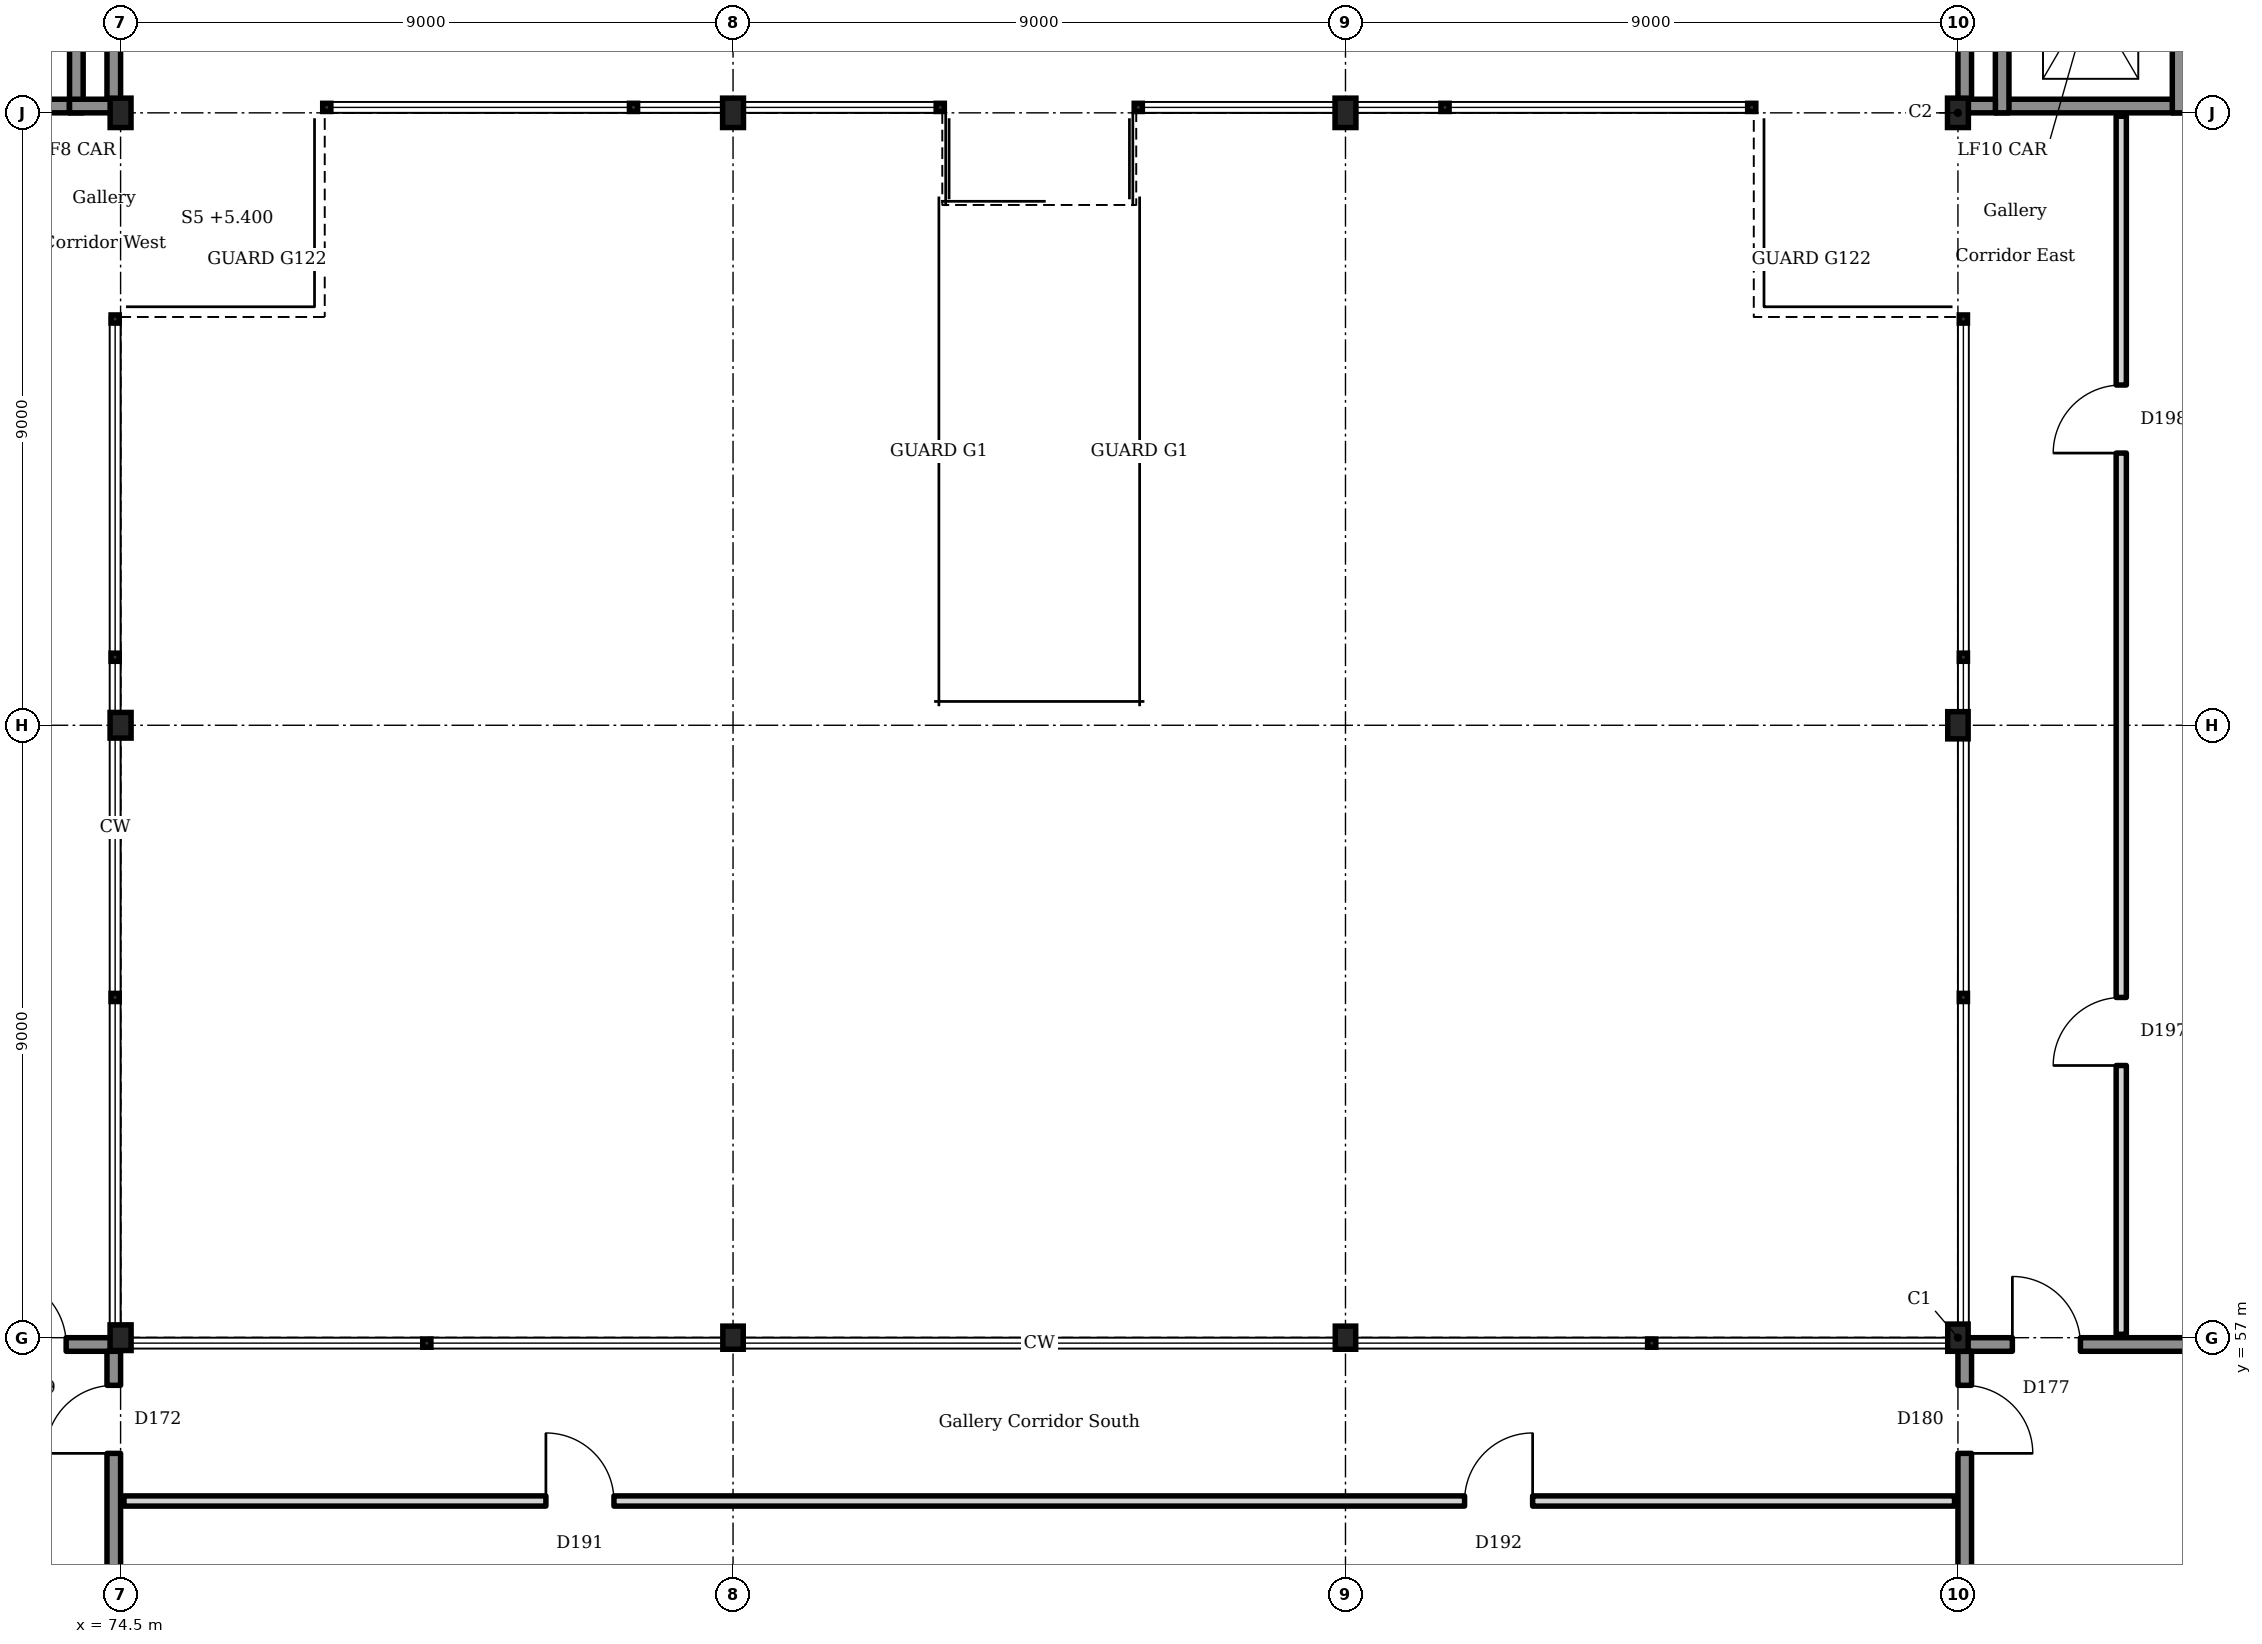
"""IFC4 building model, lengths in metres.
Left out: names, types, materials, properties, quantities, classifications, styles, units other than length and angle.
Written with IfcOpenShell. Run it as: python <this file> out.ifc"""

import sys

from ifc_helpers import new_model, si_unit, direction, frame, frame_2d, origin, origin_2d, place, context, subcontext, project, spatial, rectangle, i_section, extrude, element, fill, save


model = new_model("IFC4")
c1 = context("Model", 3, precision=1e-05, world=origin(), true_north=direction((0.0, 1.0)))
c2 = subcontext(c1, "Body", "Model", "MODEL_VIEW")
j1 = project(units=[si_unit("LENGTHUNIT", "METRE"), si_unit("PLANEANGLEUNIT", "RADIAN")], contexts=[c1])
p1 = place(None, origin())
s1 = spatial("IfcSite", under=j1, at=p1, CompositionType="ELEMENT")
p2 = place(p1, origin())
s2 = spatial("IfcBuilding", under=s1, at=p2, CompositionType="ELEMENT")
p3 = place(p2, frame((0.0, 0.0, 5.4)))
s3 = spatial("IfcBuildingStorey", under=s2, at=p3, CompositionType="ELEMENT", Elevation=5.4)
p4 = place(p3, frame((71.15, 75.1, 0.0), z_axis=(0.0, 0.0, 1.0), x_axis=(1.0, 0.0, 0.0)))
e1 = element("IfcWall", 1, at=p4, inside=s3, PredefinedType="SOLIDWALL", context=c2, shape_type="SweptSolid", body=[
    extrude(rectangle(XDim=2.6, YDim=0.2, at=frame_2d((1.3, 0.0))), origin(), (0.0, 0.0, 1.0), 4.5),
])
p5 = place(p3, frame((73.85, 75.0, 0.0), z_axis=(0.0, 0.0, 1.0), x_axis=(0.0, 1.0, 0.0)))
e2 = element("IfcWall", 2, at=p5, inside=s3, PredefinedType="SOLIDWALL", context=c2, shape_type="SweptSolid", body=[
    extrude(rectangle(XDim=3.4, YDim=0.2, at=frame_2d((1.7, 0.0))), origin(), (0.0, 0.0, 1.0), 4.5),
])
p6 = place(p3, frame((104.65, 75.1, 0.0), z_axis=(0.0, 0.0, 1.0), x_axis=(1.0, 0.0, 0.0)))
e3 = element("IfcWall", 3, at=p6, inside=s3, PredefinedType="SOLIDWALL", context=c2, shape_type="SweptSolid", body=[
    extrude(rectangle(XDim=2.6, YDim=0.2, at=frame_2d((1.3, 0.0))), origin(), (0.0, 0.0, 1.0), 4.5),
])
p7 = place(p3, frame((104.75, 75.0, 0.0), z_axis=(0.0, 0.0, 1.0), x_axis=(0.0, 1.0, 0.0)))
e4 = element("IfcWall", 4, at=p7, inside=s3, PredefinedType="SOLIDWALL", context=c2, shape_type="SweptSolid", body=[
    extrude(rectangle(XDim=3.4, YDim=0.2, at=frame_2d((1.7, 0.0))), origin(), (0.0, 0.0, 1.0), 4.5),
])
p8 = place(p3, frame((102.05, 75.1, 0.0), z_axis=(0.0, 0.0, 1.0), x_axis=(1.0, 0.0, 0.0)))
e5 = element("IfcWall", 5, at=p8, inside=s3, PredefinedType="SOLIDWALL", context=c2, shape_type="SweptSolid", body=[
    extrude(rectangle(XDim=2.6, YDim=0.2, at=frame_2d((1.3, 0.0))), origin(), (0.0, 0.0, 1.0), 4.5),
])
p9 = place(p3, frame((102.15, 75.0, 0.0), z_axis=(0.0, 0.0, 1.0), x_axis=(0.0, 1.0, 0.0)))
e6 = element("IfcWall", 6, at=p9, inside=s3, PredefinedType="SOLIDWALL", context=c2, shape_type="SweptSolid", body=[
    extrude(rectangle(XDim=3.4, YDim=0.2, at=frame_2d((1.7, 0.0))), origin(), (0.0, 0.0, 1.0), 4.5),
])
p10 = place(p3, frame((101.5, 57.0, 0.0), z_axis=(0.0, 0.0, 1.0), x_axis=(1.0, 0.0, 0.0)))
e7 = element("IfcColumn", 7, at=p10, inside=s3, PredefinedType="COLUMN", context=c2, shape_type="SweptSolid", body=[
    extrude(i_section(OverallWidth=0.3, OverallDepth=0.4, WebThickness=0.013, FlangeThickness=0.024, FilletRadius=0.027, at=origin_2d()), origin(), (0.0, 0.0, 1.0), 4.5),
])
p11 = place(p3, frame((74.5, 57.0, 0.0), z_axis=(0.0, 0.0, 1.0), x_axis=(1.0, 0.0, 0.0)))
e8 = element("IfcColumn", 8, at=p11, inside=s3, PredefinedType="COLUMN", context=c2, shape_type="SweptSolid", body=[
    extrude(i_section(OverallWidth=0.309, OverallDepth=0.377, WebThickness=0.021, FlangeThickness=0.04, FilletRadius=0.027, at=origin_2d()), origin(), (0.0, 0.0, 1.0), 4.5),
])
for number, where, z_axis, x_axis in (
    (9, (83.5, 57.0, 0.0), (0.0, 0.0, 1.0), (1.0, 0.0, 0.0)),
    (10, (92.5, 57.0, 0.0), (0.0, 0.0, 1.0), (1.0, 0.0, 0.0)),
):
    element("IfcColumn", number, at=place(p3, frame(where, z_axis=z_axis, x_axis=x_axis)), inside=s3, PredefinedType="COLUMN", context=c2, shape_type="SweptSolid", body=[
        extrude(i_section(OverallWidth=0.3, OverallDepth=0.34, WebThickness=0.012, FlangeThickness=0.021, FilletRadius=0.027, at=origin_2d()), origin(), (0.0, 0.0, 1.0), 4.25),
    ])
p12 = place(p3, frame((101.5, 66.0, 0.0), z_axis=(0.0, 0.0, 1.0), x_axis=(1.0, 0.0, 0.0)))
e11 = element("IfcColumn", 11, at=p12, inside=s3, PredefinedType="COLUMN", context=c2, shape_type="SweptSolid", body=[
    extrude(i_section(OverallWidth=0.3, OverallDepth=0.4, WebThickness=0.013, FlangeThickness=0.024, FilletRadius=0.027, at=origin_2d()), origin(), (0.0, 0.0, 1.0), 4.5),
])
p13 = place(p3, frame((74.5, 66.0, 0.0), z_axis=(0.0, 0.0, 1.0), x_axis=(1.0, 0.0, 0.0)))
e12 = element("IfcColumn", 12, at=p13, inside=s3, PredefinedType="COLUMN", context=c2, shape_type="SweptSolid", body=[
    extrude(i_section(OverallWidth=0.309, OverallDepth=0.377, WebThickness=0.021, FlangeThickness=0.04, FilletRadius=0.027, at=origin_2d()), origin(), (0.0, 0.0, 1.0), 4.5),
])
for number, where, z_axis, x_axis in (
    (13, (101.5, 75.0, 0.0), (0.0, 0.0, 1.0), (1.0, 0.0, 0.0)),
    (14, (74.5, 75.0, 0.0), (0.0, 0.0, 1.0), (1.0, 0.0, 0.0)),
    (15, (83.5, 75.0, 0.0), (0.0, 0.0, 1.0), (1.0, 0.0, 0.0)),
    (16, (92.5, 75.0, 0.0), (0.0, 0.0, 1.0), (1.0, 0.0, 0.0)),
):
    element("IfcColumn", number, at=place(p3, frame(where, z_axis=z_axis, x_axis=x_axis)), inside=s3, PredefinedType="COLUMN", context=c2, shape_type="SweptSolid", body=[
        extrude(i_section(OverallWidth=0.307, OverallDepth=0.432, WebThickness=0.021, FlangeThickness=0.04, FilletRadius=0.027, at=origin_2d()), origin(), (0.0, 0.0, 1.0), 4.5),
    ])
p14 = place(p3, frame((73.75, 75.1, 0.0), z_axis=(0.0, 0.0, 1.0), x_axis=(1.0, 0.0, 0.0)))
e17 = element("IfcWall", 17, at=p14, inside=s3, PredefinedType="SHEAR", context=c2, shape_type="SweptSolid", body=[
    extrude(rectangle(XDim=0.75, YDim=0.2, at=frame_2d((0.375, 0.0))), origin(), (0.0, 0.0, 1.0), 3.75),
])
p15 = place(p3, frame((74.4, 75.2, 0.0), z_axis=(0.0, 0.0, 1.0), x_axis=(0.0, 1.0, 0.0)))
e18 = element("IfcWall", 18, at=p15, inside=s3, PredefinedType="SHEAR", context=c2, shape_type="SweptSolid", body=[
    extrude(rectangle(XDim=8.6, YDim=0.2, at=frame_2d((4.3, 0.0))), origin(), (0.0, 0.0, 1.0), 3.75),
])
p16 = place(p15, frame((4.9, 0.0, 0.0)))
e19 = element("IfcOpeningElement", 19, at=p16, cuts=e18, PredefinedType="OPENING", context=c2, shape_type="SweptSolid", body=[
    extrude(rectangle(XDim=1.8, YDim=2.1, at=frame_2d((0.9, 1.05))), frame((0.0, 0.11, 0.0), z_axis=(0.0, -1.0, 0.0), x_axis=(1.0, 0.0, 0.0)), (0.0, 0.0, 1.0), 0.22),
])
p17 = place(p3, frame((101.5, 75.1, 0.0), z_axis=(0.0, 0.0, 1.0), x_axis=(1.0, 0.0, 0.0)))
e20 = element("IfcWall", 20, at=p17, inside=s3, PredefinedType="SHEAR", context=c2, shape_type="SweptSolid", body=[
    extrude(rectangle(XDim=0.55, YDim=0.2, at=frame_2d((0.275, 0.0))), origin(), (0.0, 0.0, 1.0), 3.75),
])
p18 = place(p3, frame((101.6, 75.2, 0.0), z_axis=(0.0, 0.0, 1.0), x_axis=(0.0, 1.0, 0.0)))
e21 = element("IfcWall", 21, at=p18, inside=s3, PredefinedType="SHEAR", context=c2, shape_type="SweptSolid", body=[
    extrude(rectangle(XDim=8.6, YDim=0.2, at=frame_2d((4.3, 0.0))), origin(), (0.0, 0.0, 1.0), 3.75),
])
p19 = place(p18, frame((4.9, 0.0, 0.0)))
e22 = element("IfcOpeningElement", 22, at=p19, cuts=e21, PredefinedType="OPENING", context=c2, shape_type="SweptSolid", body=[
    extrude(rectangle(XDim=1.8, YDim=2.1, at=frame_2d((0.9, 1.05))), frame((0.0, 0.11, 0.0), z_axis=(0.0, -1.0, 0.0), x_axis=(1.0, 0.0, 0.0)), (0.0, 0.0, 1.0), 0.22),
])
p20 = place(p3, frame((65.5, 56.9, 0.0), z_axis=(0.0, 0.0, 1.0), x_axis=(1.0, 0.0, 0.0)))
e23 = element("IfcWall", 23, at=p20, inside=s3, PredefinedType="SHEAR", context=c2, shape_type="SweptSolid", body=[
    extrude(rectangle(XDim=9.0, YDim=0.2, at=frame_2d((4.5, 0.0))), origin(), (0.0, 0.0, 1.0), 4.25),
])
p21 = place(p20, frame((7.2, 0.0, 0.0)))
e24 = element("IfcOpeningElement", 24, at=p21, cuts=e23, PredefinedType="OPENING", context=c2, shape_type="SweptSolid", body=[
    extrude(rectangle(XDim=1.0, YDim=2.1, at=frame_2d((0.5, 1.05))), frame((0.0, 0.11, 0.0), z_axis=(0.0, -1.0, 0.0), x_axis=(1.0, 0.0, 0.0)), (0.0, 0.0, 1.0), 0.22),
])
p22 = place(p3, frame((74.4, 48.15, 0.0), z_axis=(0.0, 0.0, 1.0), x_axis=(0.0, 1.0, 0.0)))
e25 = element("IfcWall", 25, at=p22, inside=s3, PredefinedType="SHEAR", context=c2, shape_type="SweptSolid", body=[
    extrude(rectangle(XDim=8.65, YDim=0.2, at=frame_2d((4.325, 0.0))), origin(), (0.0, 0.0, 1.0), 3.8),
])
p23 = place(p22, frame((7.15, 0.0, 0.0)))
e26 = element("IfcOpeningElement", 26, at=p23, cuts=e25, PredefinedType="OPENING", context=c2, shape_type="SweptSolid", body=[
    extrude(rectangle(XDim=1.0, YDim=2.1, at=frame_2d((0.5, 1.05))), frame((0.0, 0.11, 0.0), z_axis=(0.0, -1.0, 0.0), x_axis=(1.0, 0.0, 0.0)), (0.0, 0.0, 1.0), 0.22),
])
p24 = place(p3, frame((101.5, 56.9, 0.0), z_axis=(0.0, 0.0, 1.0), x_axis=(1.0, 0.0, 0.0)))
e27 = element("IfcWall", 27, at=p24, inside=s3, PredefinedType="SHEAR", context=c2, shape_type="SweptSolid", body=[
    extrude(rectangle(XDim=9.0, YDim=0.2, at=frame_2d((4.5, 0.0))), origin(), (0.0, 0.0, 1.0), 4.25),
])
p25 = place(p24, frame((0.8, 0.0, 0.0)))
e28 = element("IfcOpeningElement", 28, at=p25, cuts=e27, PredefinedType="OPENING", context=c2, shape_type="SweptSolid", body=[
    extrude(rectangle(XDim=1.0, YDim=2.1, at=frame_2d((0.5, 1.05))), frame((0.0, 0.11, 0.0), z_axis=(0.0, -1.0, 0.0), x_axis=(1.0, 0.0, 0.0)), (0.0, 0.0, 1.0), 0.22),
])
p26 = place(p3, frame((101.6, 48.15, 0.0), z_axis=(0.0, 0.0, 1.0), x_axis=(0.0, 1.0, 0.0)))
e29 = element("IfcWall", 29, at=p26, inside=s3, PredefinedType="SHEAR", context=c2, shape_type="SweptSolid", body=[
    extrude(rectangle(XDim=8.65, YDim=0.2, at=frame_2d((4.325, 0.0))), origin(), (0.0, 0.0, 1.0), 3.8),
])
p27 = place(p26, frame((7.15, 0.0, 0.0)))
e30 = element("IfcOpeningElement", 30, at=p27, cuts=e29, PredefinedType="OPENING", context=c2, shape_type="SweptSolid", body=[
    extrude(rectangle(XDim=1.0, YDim=2.1, at=frame_2d((0.5, 1.05))), frame((0.0, 0.11, 0.0), z_axis=(0.0, -1.0, 0.0), x_axis=(1.0, 0.0, 0.0)), (0.0, 0.0, 1.0), 0.22),
])
p28 = place(p3, frame((74.55, 54.6, 0.0), z_axis=(0.0, 0.0, 1.0), x_axis=(1.0, 0.0, 0.0)))
e31 = element("IfcWall", 31, at=p28, inside=s3, PredefinedType="PARTITIONING", context=c2, shape_type="SweptSolid", body=[
    extrude(rectangle(XDim=26.9, YDim=0.15, at=frame_2d((13.45, 0.0))), origin(), (0.0, 0.0, 1.0), 3.65),
])
p29 = place(p28, frame((6.2, 0.0, 0.0)))
e32 = element("IfcOpeningElement", 32, at=p29, cuts=e31, PredefinedType="OPENING", context=c2, shape_type="SweptSolid", body=[
    extrude(rectangle(XDim=1.0, YDim=2.1, at=frame_2d((0.5, 1.05))), frame((0.0, 0.085, 0.0), z_axis=(0.0, -1.0, 0.0), x_axis=(1.0, 0.0, 0.0)), (0.0, 0.0, 1.0), 0.17),
])
p30 = place(p28, frame((19.7, 0.0, 0.0)))
e33 = element("IfcOpeningElement", 33, at=p30, cuts=e31, PredefinedType="OPENING", context=c2, shape_type="SweptSolid", body=[
    extrude(rectangle(XDim=1.0, YDim=2.1, at=frame_2d((0.5, 1.05))), frame((0.0, 0.085, 0.0), z_axis=(0.0, -1.0, 0.0), x_axis=(1.0, 0.0, 0.0)), (0.0, 0.0, 1.0), 0.17),
])
p31 = place(p3, frame((103.9, 57.05, 0.0), z_axis=(0.0, 0.0, 1.0), x_axis=(0.0, 1.0, 0.0)))
e34 = element("IfcWall", 34, at=p31, inside=s3, PredefinedType="PARTITIONING", context=c2, shape_type="SweptSolid", body=[
    extrude(rectangle(XDim=17.9, YDim=0.15, at=frame_2d((8.95, 0.0))), origin(), (0.0, 0.0, 1.0), 3.7),
])
p32 = place(p31, frame((3.95, 0.0, 0.0)))
e35 = element("IfcOpeningElement", 35, at=p32, cuts=e34, PredefinedType="OPENING", context=c2, shape_type="SweptSolid", body=[
    extrude(rectangle(XDim=1.0, YDim=2.1, at=frame_2d((0.5, 1.05))), frame((0.0, 0.085, 0.0), z_axis=(0.0, -1.0, 0.0), x_axis=(1.0, 0.0, 0.0)), (0.0, 0.0, 1.0), 0.17),
])
p33 = place(p31, frame((12.95, 0.0, 0.0)))
e36 = element("IfcOpeningElement", 36, at=p33, cuts=e34, PredefinedType="OPENING", context=c2, shape_type="SweptSolid", body=[
    extrude(rectangle(XDim=1.0, YDim=2.1, at=frame_2d((0.5, 1.05))), frame((0.0, 0.085, 0.0), z_axis=(0.0, -1.0, 0.0), x_axis=(1.0, 0.0, 0.0)), (0.0, 0.0, 1.0), 0.17),
])
p34 = place(p21, origin())
e37 = element("IfcDoor", 37, at=p34, inside=s3, OperationType="SINGLE_SWING_RIGHT", PredefinedType="DOOR", context=c2, shape_type="SweptSolid", body=[
    extrude(rectangle(XDim=1.0, YDim=2.1, at=frame_2d((0.5, 1.05))), frame((0.0, 0.025, 0.0), z_axis=(0.0, -1.0, 0.0), x_axis=(1.0, 0.0, 0.0)), (0.0, 0.0, 1.0), 0.05),
])
fill(e24, e37)
p35 = place(p23, origin())
e38 = element("IfcDoor", 38, at=p35, inside=s3, OperationType="SINGLE_SWING_RIGHT", PredefinedType="DOOR", context=c2, shape_type="SweptSolid", body=[
    extrude(rectangle(XDim=1.0, YDim=2.1, at=frame_2d((0.5, 1.05))), frame((0.0, 0.025, 0.0), z_axis=(0.0, -1.0, 0.0), x_axis=(1.0, 0.0, 0.0)), (0.0, 0.0, 1.0), 0.05),
])
fill(e26, e38)
p36 = place(p25, origin())
e39 = element("IfcDoor", 39, at=p36, inside=s3, OperationType="SINGLE_SWING_RIGHT", PredefinedType="DOOR", context=c2, shape_type="SweptSolid", body=[
    extrude(rectangle(XDim=1.0, YDim=2.1, at=frame_2d((0.5, 1.05))), frame((0.0, 0.025, 0.0), z_axis=(0.0, -1.0, 0.0), x_axis=(1.0, 0.0, 0.0)), (0.0, 0.0, 1.0), 0.05),
])
fill(e28, e39)
p37 = place(p27, frame((1.0, 0.0, 0.0), z_axis=(0.0, 0.0, 1.0), x_axis=(-1.0, 0.0, 0.0)))
e40 = element("IfcDoor", 40, at=p37, inside=s3, OperationType="SINGLE_SWING_LEFT", PredefinedType="DOOR", context=c2, shape_type="SweptSolid", body=[
    extrude(rectangle(XDim=1.0, YDim=2.1, at=frame_2d((0.5, 1.05))), frame((0.0, 0.025, 0.0), z_axis=(0.0, -1.0, 0.0), x_axis=(1.0, 0.0, 0.0)), (0.0, 0.0, 1.0), 0.05),
])
fill(e30, e40)
p38 = place(p29, origin())
e41 = element("IfcDoor", 41, at=p38, inside=s3, OperationType="SINGLE_SWING_RIGHT", PredefinedType="DOOR", context=c2, shape_type="SweptSolid", body=[
    extrude(rectangle(XDim=1.0, YDim=2.1, at=frame_2d((0.5, 1.05))), frame((0.0, 0.025, 0.0), z_axis=(0.0, -1.0, 0.0), x_axis=(1.0, 0.0, 0.0)), (0.0, 0.0, 1.0), 0.05),
])
fill(e32, e41)
p39 = place(p30, origin())
e42 = element("IfcDoor", 42, at=p39, inside=s3, OperationType="SINGLE_SWING_LEFT", PredefinedType="DOOR", context=c2, shape_type="SweptSolid", body=[
    extrude(rectangle(XDim=1.0, YDim=2.1, at=frame_2d((0.5, 1.05))), frame((0.0, 0.025, 0.0), z_axis=(0.0, -1.0, 0.0), x_axis=(1.0, 0.0, 0.0)), (0.0, 0.0, 1.0), 0.05),
])
fill(e33, e42)
p40 = place(p32, origin())
e43 = element("IfcDoor", 43, at=p40, inside=s3, OperationType="SINGLE_SWING_RIGHT", PredefinedType="DOOR", context=c2, shape_type="SweptSolid", body=[
    extrude(rectangle(XDim=1.0, YDim=2.1, at=frame_2d((0.5, 1.05))), frame((0.0, 0.025, 0.0), z_axis=(0.0, -1.0, 0.0), x_axis=(1.0, 0.0, 0.0)), (0.0, 0.0, 1.0), 0.05),
])
fill(e35, e43)
p41 = place(p33, origin())
e44 = element("IfcDoor", 44, at=p41, inside=s3, OperationType="SINGLE_SWING_RIGHT", PredefinedType="DOOR", context=c2, shape_type="SweptSolid", body=[
    extrude(rectangle(XDim=1.0, YDim=2.1, at=frame_2d((0.5, 1.05))), frame((0.0, 0.025, 0.0), z_axis=(0.0, -1.0, 0.0), x_axis=(1.0, 0.0, 0.0)), (0.0, 0.0, 1.0), 0.05),
])
fill(e36, e44)
save(model, sys.argv[1])
